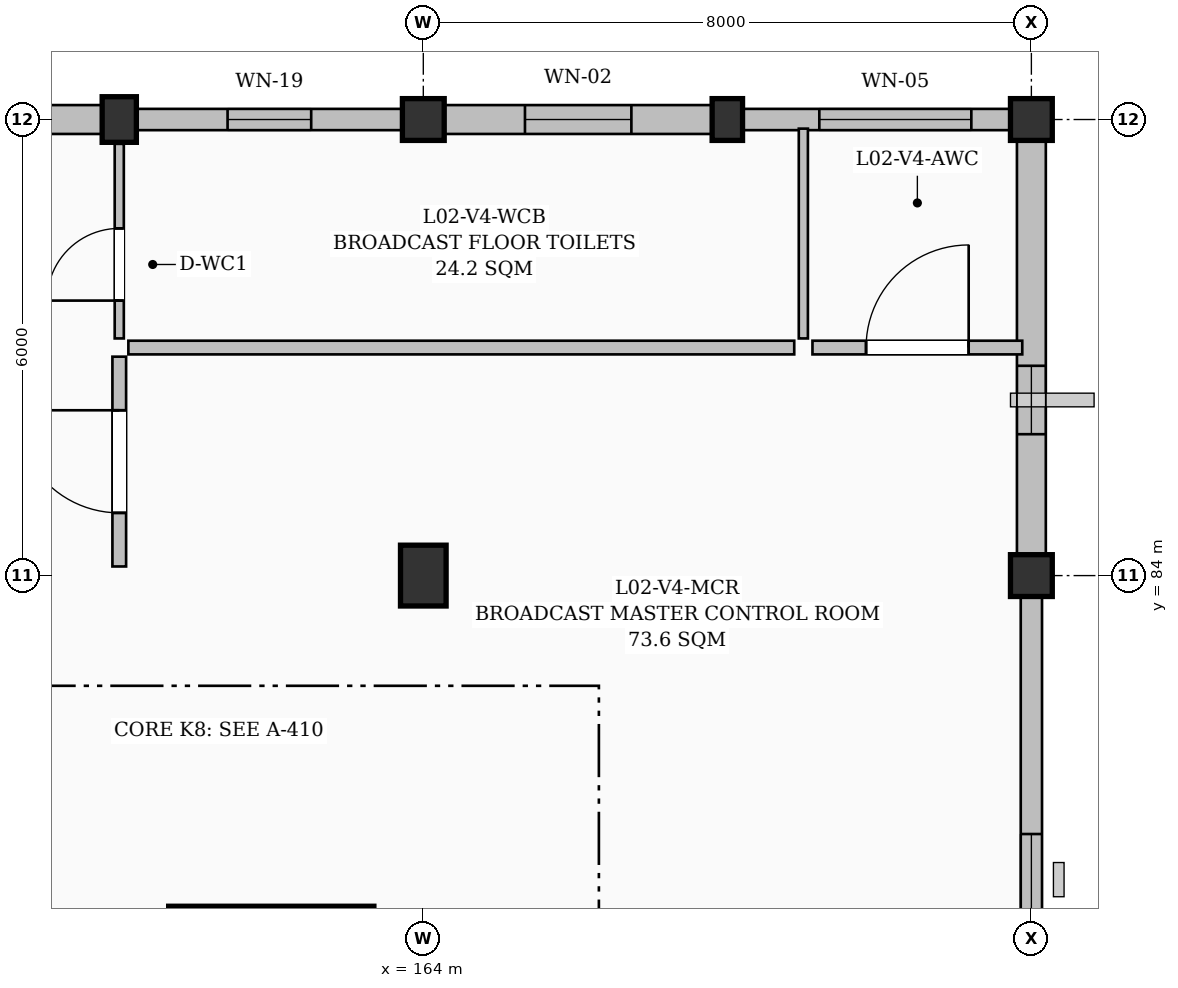
"""IFC4 building model, lengths in metres.
Left out: names, types, materials, properties, quantities, classifications, styles, units other than length and angle.
Written with IfcOpenShell. Run it as: python <this file> out.ifc"""

import sys

from ifc_helpers import new_model, si_unit, direction, frame, frame_2d, origin, origin_2d, place, context, subcontext, project, spatial, rectangle, extrude, element, fill, save


model = new_model("IFC4")
c1 = context("Model", 3, precision=1e-05, world=origin(), true_north=direction((0.0, 1.0)))
c2 = subcontext(c1, "Body", "Model", "MODEL_VIEW")
j1 = project(units=[si_unit("LENGTHUNIT", "METRE"), si_unit("PLANEANGLEUNIT", "RADIAN")], contexts=[c1])
p1 = place(None, origin())
s1 = spatial("IfcSite", under=j1, at=p1, CompositionType="ELEMENT")
p2 = place(p1, origin())
s2 = spatial("IfcBuilding", under=s1, at=p2, CompositionType="ELEMENT")
p3 = place(p2, frame((0.0, 0.0, 9.3)))
s3 = spatial("IfcBuildingStorey", under=s2, at=p3, CompositionType="ELEMENT", Elevation=9.3)
p4 = place(p3, frame((160.0, 90.0, 0.0), z_axis=(0.0, 0.0, 1.0), x_axis=(1.0, 0.0, 0.0)))
e1 = element("IfcColumn", 1, at=p4, inside=s3, PredefinedType="PILASTER", context=c2, shape_type="SweptSolid", body=[
    extrude(rectangle(XDim=0.45, YDim=0.6, at=origin_2d()), origin(), (0.0, 0.0, 1.0), 4.5),
])
p5 = place(p3, frame((164.0, 84.0, 0.0), z_axis=(0.0, 0.0, 1.0), x_axis=(1.0, 0.0, 0.0)))
e2 = element("IfcColumn", 2, at=p5, inside=s3, PredefinedType="COLUMN", context=c2, shape_type="SweptSolid", body=[
    extrude(rectangle(XDim=0.6, YDim=0.8, at=origin_2d()), origin(), (0.0, 0.0, 1.0), 4.5),
])
p6 = place(p3, frame((164.0, 90.0, 0.0), z_axis=(0.0, 0.0, 1.0), x_axis=(1.0, 0.0, 0.0)))
e3 = element("IfcColumn", 3, at=p6, inside=s3, PredefinedType="COLUMN", context=c2, shape_type="SweptSolid", body=[
    extrude(rectangle(XDim=0.55, YDim=0.55, at=origin_2d()), origin(), (0.0, 0.0, 1.0), 4.5),
])
p7 = place(p3, frame((168.0, 90.0, 0.0), z_axis=(0.0, 0.0, 1.0), x_axis=(1.0, 0.0, 0.0)))
e4 = element("IfcColumn", 4, at=p7, inside=s3, PredefinedType="PILASTER", context=c2, shape_type="SweptSolid", body=[
    extrude(rectangle(XDim=0.4, YDim=0.55, at=origin_2d()), origin(), (0.0, 0.0, 1.0), 4.5),
])
for number, where, z_axis, x_axis in (
    (5, (172.0, 84.0, 0.0), (0.0, 0.0, 1.0), (1.0, 0.0, 0.0)),
    (6, (172.0, 90.0, 0.0), (0.0, 0.0, 1.0), (1.0, 0.0, 0.0)),
):
    element("IfcColumn", number, at=place(p3, frame(where, z_axis=z_axis, x_axis=x_axis)), inside=s3, PredefinedType="COLUMN", context=c2, shape_type="SweptSolid", body=[
        extrude(rectangle(XDim=0.55, YDim=0.55, at=origin_2d()), origin(), (0.0, 0.0, 1.0), 4.5),
    ])
p8 = place(p3, frame((156.275, 90.0, 0.0), z_axis=(0.0, 0.0, 1.0), x_axis=(1.0, 0.0, 0.0)))
e7 = element("IfcWall", 7, at=p8, inside=s3, PredefinedType="SOLIDWALL", context=c2, shape_type="SweptSolid", body=[
    extrude(rectangle(XDim=3.5, YDim=0.38, at=frame_2d((1.75, 0.0))), origin(), (0.0, 0.0, 1.0), 3.655),
])
p9 = place(p8, frame((0.75, 0.0, 0.95)))
e8 = element("IfcOpeningElement", 8, at=p9, cuts=e7, PredefinedType="OPENING", context=c2, shape_type="SweptSolid", body=[
    extrude(rectangle(XDim=2.0, YDim=1.2, at=frame_2d((1.0, 0.6))), frame((0.0, 0.2, 0.0), z_axis=(0.0, -1.0, 0.0), x_axis=(1.0, 0.0, 0.0)), (0.0, 0.0, 1.0), 0.4),
])
p10 = place(p3, frame((160.225, 90.0, 0.0), z_axis=(0.0, 0.0, 1.0), x_axis=(1.0, 0.0, 0.0)))
e9 = element("IfcWall", 9, at=p10, inside=s3, PredefinedType="SOLIDWALL", context=c2, shape_type="SweptSolid", body=[
    extrude(rectangle(XDim=3.5, YDim=0.28, at=frame_2d((1.75, 0.0))), origin(), (0.0, 0.0, 1.0), 3.655),
])
p11 = place(p10, frame((1.2, 0.0, 0.95)))
e10 = element("IfcOpeningElement", 10, at=p11, cuts=e9, PredefinedType="OPENING", context=c2, shape_type="SweptSolid", body=[
    extrude(rectangle(XDim=1.1, YDim=2.0, at=frame_2d((0.55, 1.0))), frame((0.0, 0.15, 0.0), z_axis=(0.0, -1.0, 0.0), x_axis=(1.0, 0.0, 0.0)), (0.0, 0.0, 1.0), 0.3),
])
p12 = place(p3, frame((164.275, 90.0, 0.0), z_axis=(0.0, 0.0, 1.0), x_axis=(1.0, 0.0, 0.0)))
e11 = element("IfcWall", 11, at=p12, inside=s3, PredefinedType="SOLIDWALL", context=c2, shape_type="SweptSolid", body=[
    extrude(rectangle(XDim=3.525, YDim=0.38, at=frame_2d((1.763, 0.0))), origin(), (0.0, 0.0, 1.0), 3.955),
])
p13 = place(p12, frame((1.062, 0.0, 0.95)))
e12 = element("IfcOpeningElement", 12, at=p13, cuts=e11, PredefinedType="OPENING", context=c2, shape_type="SweptSolid", body=[
    extrude(rectangle(XDim=1.4, YDim=1.8, at=frame_2d((0.7, 0.9))), frame((0.0, 0.2, 0.0), z_axis=(0.0, -1.0, 0.0), x_axis=(1.0, 0.0, 0.0)), (0.0, 0.0, 1.0), 0.4),
])
p14 = place(p3, frame((168.2, 90.0, 0.0), z_axis=(0.0, 0.0, 1.0), x_axis=(1.0, 0.0, 0.0)))
e13 = element("IfcWall", 13, at=p14, inside=s3, PredefinedType="SOLIDWALL", context=c2, shape_type="SweptSolid", body=[
    extrude(rectangle(XDim=3.525, YDim=0.28, at=frame_2d((1.763, 0.0))), origin(), (0.0, 0.0, 1.0), 3.955),
])
p15 = place(p14, frame((1.01, 0.0, 0.95)))
e14 = element("IfcOpeningElement", 14, at=p15, cuts=e13, PredefinedType="OPENING", context=c2, shape_type="SweptSolid", body=[
    extrude(rectangle(XDim=2.0, YDim=1.8, at=frame_2d((1.0, 0.9))), frame((0.0, 0.15, 0.0), z_axis=(0.0, -1.0, 0.0), x_axis=(1.0, 0.0, 0.0)), (0.0, 0.0, 1.0), 0.3),
])
p16 = place(p3, frame((172.0, 89.725, 0.0), z_axis=(0.0, 0.0, 1.0), x_axis=(0.0, -1.0, 0.0)))
e15 = element("IfcWall", 15, at=p16, inside=s3, PredefinedType="SOLIDWALL", context=c2, shape_type="SweptSolid", body=[
    extrude(rectangle(XDim=5.45, YDim=0.38, at=frame_2d((2.725, 0.0))), origin(), (0.0, 0.0, 1.0), 3.705),
])
p17 = place(p16, frame((2.965, 0.0, 0.95)))
e16 = element("IfcOpeningElement", 16, at=p17, cuts=e15, PredefinedType="OPENING", context=c2, shape_type="SweptSolid", body=[
    extrude(rectangle(XDim=0.9, YDim=1.8, at=frame_2d((0.45, 0.9))), frame((0.0, 0.2, 0.0), z_axis=(0.0, -1.0, 0.0), x_axis=(1.0, 0.0, 0.0)), (0.0, 0.0, 1.0), 0.4),
])
p18 = place(p3, frame((172.0, 83.725, 0.0), z_axis=(0.0, 0.0, 1.0), x_axis=(0.0, -1.0, 0.0)))
e17 = element("IfcWall", 17, at=p18, inside=s3, PredefinedType="SOLIDWALL", context=c2, shape_type="SweptSolid", body=[
    extrude(rectangle(XDim=7.45, YDim=0.28, at=frame_2d((3.725, 0.0))), origin(), (0.0, 0.0, 1.0), 4.055),
])
p19 = place(p18, frame((3.125, 0.0, 0.95)))
e18 = element("IfcOpeningElement", 18, at=p19, cuts=e17, PredefinedType="OPENING", context=c2, shape_type="SweptSolid", body=[
    extrude(rectangle(XDim=1.2, YDim=1.8, at=frame_2d((0.6, 0.9))), frame((0.0, 0.15, 0.0), z_axis=(0.0, -1.0, 0.0), x_axis=(1.0, 0.0, 0.0)), (0.0, 0.0, 1.0), 0.3),
])
p20 = place(p3, frame((163.35, 79.5, 0.0), z_axis=(0.0, 0.0, 1.0), x_axis=(-1.0, 0.0, 0.0)))
e19 = element("IfcWall", 19, at=p20, inside=s3, PredefinedType="SHEAR", context=c2, shape_type="SweptSolid", body=[
    extrude(rectangle(XDim=2.7, YDim=0.3, at=frame_2d((1.35, 0.0))), origin(), (0.0, 0.0, 1.0), 4.27),
])
p21 = place(p3, frame((160.0, 84.12, 0.0), z_axis=(0.0, 0.0, 1.0), x_axis=(0.0, 1.0, 0.0)))
e20 = element("IfcWall", 20, at=p21, inside=s3, PredefinedType="PARTITIONING", context=c2, shape_type="SweptSolid", body=[
    extrude(rectangle(XDim=2.76, YDim=0.18, at=frame_2d((1.38, 0.0))), origin(), (0.0, 0.0, 1.0), 4.27),
])
p22 = place(p21, frame((0.705, 0.0, 0.0)))
e21 = element("IfcOpeningElement", 21, at=p22, cuts=e20, PredefinedType="OPENING", context=c2, shape_type="SweptSolid", body=[
    extrude(rectangle(XDim=1.35, YDim=2.2, at=frame_2d((0.675, 1.1))), frame((0.0, 0.1, 0.0), z_axis=(0.0, -1.0, 0.0), x_axis=(1.0, 0.0, 0.0)), (0.0, 0.0, 1.0), 0.2),
])
p23 = place(p3, frame((160.0, 87.12, 0.0), z_axis=(0.0, 0.0, 1.0), x_axis=(0.0, 1.0, 0.0)))
e22 = element("IfcWall", 22, at=p23, inside=s3, PredefinedType="PARTITIONING", context=c2, shape_type="SweptSolid", body=[
    extrude(rectangle(XDim=2.56, YDim=0.12, at=frame_2d((1.28, 0.0))), origin(), (0.0, 0.0, 1.0), 4.27),
])
p24 = place(p23, frame((0.498, 0.0, 0.0)))
e23 = element("IfcOpeningElement", 23, at=p24, cuts=e22, PredefinedType="OPENING", context=c2, shape_type="SweptSolid", body=[
    extrude(rectangle(XDim=0.95, YDim=2.1, at=frame_2d((0.475, 1.05))), frame((0.0, 0.07, 0.0), z_axis=(0.0, -1.0, 0.0), x_axis=(1.0, 0.0, 0.0)), (0.0, 0.0, 1.0), 0.14),
])
p25 = place(p3, frame((169.12, 87.0, 0.0), z_axis=(0.0, 0.0, 1.0), x_axis=(1.0, 0.0, 0.0)))
e24 = element("IfcWall", 24, at=p25, inside=s3, PredefinedType="PARTITIONING", context=c2, shape_type="SweptSolid", body=[
    extrude(rectangle(XDim=2.76, YDim=0.18, at=frame_2d((1.38, 0.0))), origin(), (0.0, 0.0, 1.0), 3.855),
])
p26 = place(p25, frame((0.705, 0.0, 0.0)))
e25 = element("IfcOpeningElement", 25, at=p26, cuts=e24, PredefinedType="OPENING", context=c2, shape_type="SweptSolid", body=[
    extrude(rectangle(XDim=1.35, YDim=2.2, at=frame_2d((0.675, 1.1))), frame((0.0, 0.1, 0.0), z_axis=(0.0, -1.0, 0.0), x_axis=(1.0, 0.0, 0.0)), (0.0, 0.0, 1.0), 0.2),
])
p27 = place(p3, frame((160.12, 87.0, 0.0), z_axis=(0.0, 0.0, 1.0), x_axis=(1.0, 0.0, 0.0)))
e26 = element("IfcWall", 26, at=p27, inside=s3, PredefinedType="PARTITIONING", context=c2, shape_type="SweptSolid", body=[
    extrude(rectangle(XDim=8.76, YDim=0.18, at=frame_2d((4.38, 0.0))), origin(), (0.0, 0.0, 1.0), 3.855),
])
p28 = place(p3, frame((169.0, 87.12, 0.0), z_axis=(0.0, 0.0, 1.0), x_axis=(0.0, 1.0, 0.0)))
e27 = element("IfcWall", 27, at=p28, inside=s3, PredefinedType="PARTITIONING", context=c2, shape_type="SweptSolid", body=[
    extrude(rectangle(XDim=2.76, YDim=0.12, at=frame_2d((1.38, 0.0))), origin(), (0.0, 0.0, 1.0), 4.27),
])
p29 = place(p11, origin())
e28 = element("IfcWindow", 28, at=p29, inside=s3, PartitioningType="SINGLE_PANEL", PredefinedType="WINDOW", context=c2, shape_type="SweptSolid", body=[
    extrude(rectangle(XDim=1.1, YDim=2.0, at=frame_2d((0.55, 1.0))), frame((0.0, 0.03, 0.0), z_axis=(0.0, -1.0, 0.0), x_axis=(1.0, 0.0, 0.0)), (0.0, 0.0, 1.0), 0.06),
])
fill(e10, e28)
p30 = place(p13, origin())
e29 = element("IfcWindow", 29, at=p30, inside=s3, PartitioningType="DOUBLE_PANEL_VERTICAL", PredefinedType="WINDOW", context=c2, shape_type="SweptSolid", body=[
    extrude(rectangle(XDim=1.4, YDim=1.8, at=frame_2d((0.7, 0.9))), frame((0.0, 0.03, 0.0), z_axis=(0.0, -1.0, 0.0), x_axis=(1.0, 0.0, 0.0)), (0.0, 0.0, 1.0), 0.06),
])
fill(e12, e29)
p31 = place(p15, origin())
e30 = element("IfcWindow", 30, at=p31, inside=s3, PartitioningType="TRIPLE_PANEL_VERTICAL", PredefinedType="WINDOW", context=c2, shape_type="SweptSolid", body=[
    extrude(rectangle(XDim=2.0, YDim=1.8, at=frame_2d((1.0, 0.9))), frame((0.0, 0.03, 0.0), z_axis=(0.0, -1.0, 0.0), x_axis=(1.0, 0.0, 0.0)), (0.0, 0.0, 1.0), 0.06),
])
fill(e14, e30)
p32 = place(p17, origin())
e31 = element("IfcWindow", 31, at=p32, inside=s3, PartitioningType="SINGLE_PANEL", PredefinedType="WINDOW", context=c2, shape_type="SweptSolid", body=[
    extrude(rectangle(XDim=0.9, YDim=1.8, at=frame_2d((0.45, 0.9))), frame((0.0, 0.03, 0.0), z_axis=(0.0, -1.0, 0.0), x_axis=(1.0, 0.0, 0.0)), (0.0, 0.0, 1.0), 0.06),
])
fill(e16, e31)
p33 = place(p19, origin())
e32 = element("IfcWindow", 32, at=p33, inside=s3, PartitioningType="SINGLE_PANEL", PredefinedType="WINDOW", context=c2, shape_type="SweptSolid", body=[
    extrude(rectangle(XDim=1.2, YDim=1.8, at=frame_2d((0.6, 0.9))), frame((0.0, 0.03, 0.0), z_axis=(0.0, -1.0, 0.0), x_axis=(1.0, 0.0, 0.0)), (0.0, 0.0, 1.0), 0.06),
])
fill(e18, e32)
p34 = place(p22, origin())
e33 = element("IfcDoor", 33, at=p34, inside=s3, OperationType="SINGLE_SWING_RIGHT", PredefinedType="DOOR", context=c2, shape_type="SweptSolid", body=[
    extrude(rectangle(XDim=1.35, YDim=2.2, at=frame_2d((0.675, 1.1))), frame((0.0, 0.025, 0.0), z_axis=(0.0, -1.0, 0.0), x_axis=(1.0, 0.0, 0.0)), (0.0, 0.0, 1.0), 0.05),
])
fill(e21, e33)
p35 = place(p24, origin())
e34 = element("IfcDoor", 34, at=p35, inside=s3, OperationType="SINGLE_SWING_LEFT", PredefinedType="DOOR", context=c2, shape_type="SweptSolid", body=[
    extrude(rectangle(XDim=0.95, YDim=2.1, at=frame_2d((0.475, 1.05))), frame((0.0, 0.025, 0.0), z_axis=(0.0, -1.0, 0.0), x_axis=(1.0, 0.0, 0.0)), (0.0, 0.0, 1.0), 0.05),
])
fill(e23, e34)
p36 = place(p26, origin())
e35 = element("IfcDoor", 35, at=p36, inside=s3, OperationType="SINGLE_SWING_RIGHT", PredefinedType="DOOR", context=c2, shape_type="SweptSolid", body=[
    extrude(rectangle(XDim=1.35, YDim=2.2, at=frame_2d((0.675, 1.1))), frame((0.0, 0.025, 0.0), z_axis=(0.0, -1.0, 0.0), x_axis=(1.0, 0.0, 0.0)), (0.0, 0.0, 1.0), 0.05),
])
fill(e25, e35)
save(model, sys.argv[1])
